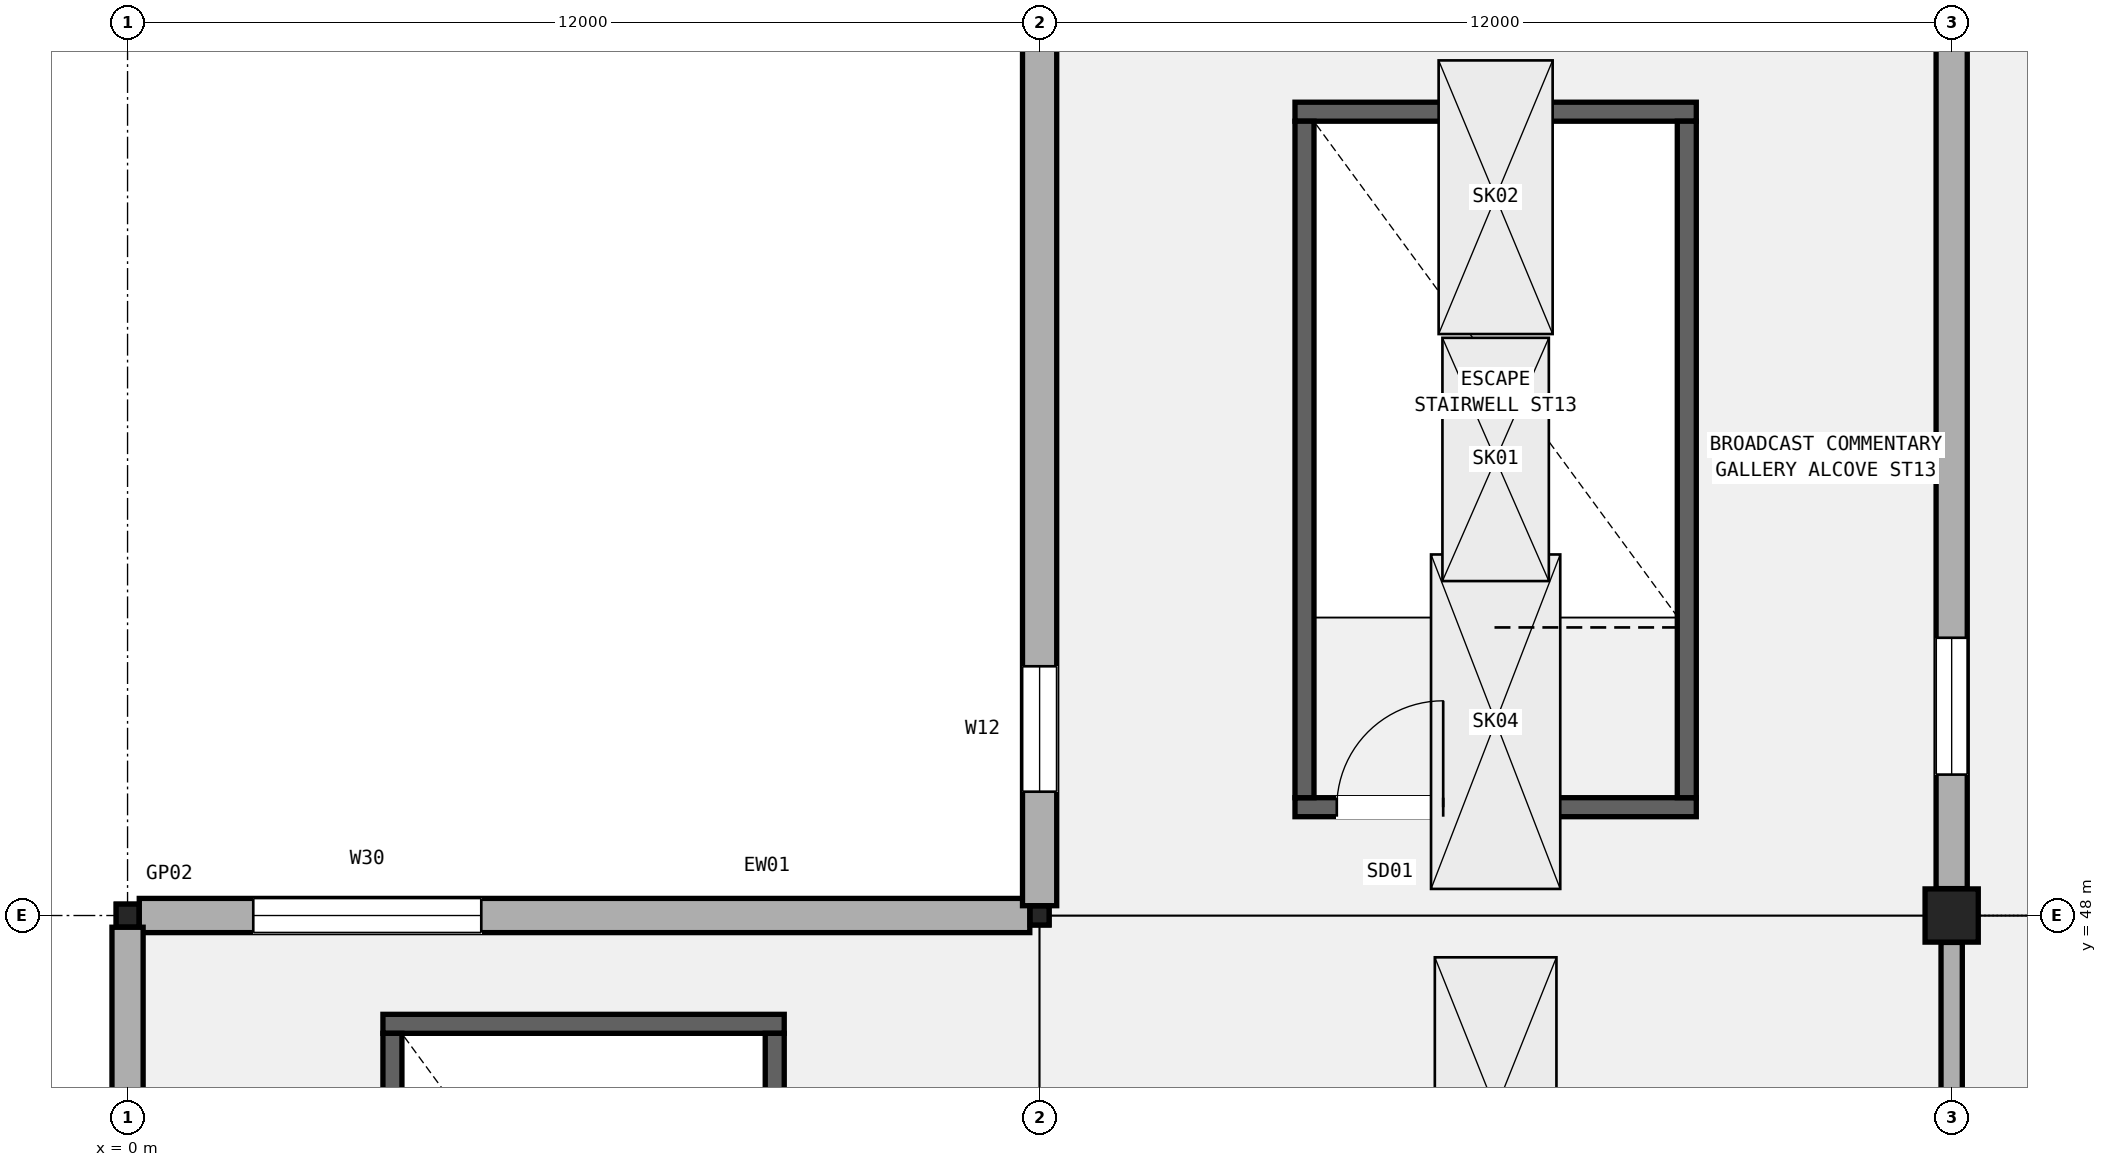
"""IFC4 building model, lengths in metres.
Left out: names, types, materials, properties, quantities, classifications, styles, units other than length and angle.
Written with IfcOpenShell. Run it as: python <this file> out.ifc"""

import sys

from ifc_helpers import new_model, si_unit, direction, frame, frame_2d, origin, origin_2d, place, context, subcontext, project, spatial, rectangle, hollow_rectangle, extrude, element, fill, save


model = new_model("IFC4")
c1 = context("Model", 3, precision=1e-05, world=origin(), true_north=direction((0.0, 1.0)))
c2 = subcontext(c1, "Body", "Model", "MODEL_VIEW")
j1 = project(units=[si_unit("LENGTHUNIT", "METRE"), si_unit("PLANEANGLEUNIT", "RADIAN")], contexts=[c1])
p1 = place(None, origin())
s1 = spatial("IfcSite", under=j1, at=p1, CompositionType="ELEMENT")
p2 = place(p1, origin())
s2 = spatial("IfcBuilding", under=s1, at=p2, CompositionType="ELEMENT")
p3 = place(p2, frame((0.0, 0.0, 25.8)))
s3 = spatial("IfcBuildingStorey", under=s2, at=p3, CompositionType="ELEMENT", Elevation=25.8)
p4 = place(p3, frame((0.0, 48.0, 0.0), z_axis=(0.0, 0.0, 1.0), x_axis=(1.0, 0.0, 0.0)))
e1 = element("IfcColumn", 1, at=p4, inside=s3, PredefinedType="COLUMN", context=c2, shape_type="SweptSolid", body=[
    extrude(hollow_rectangle(XDim=0.3, YDim=0.3, WallThickness=0.012, InnerFilletRadius=0.012, OuterFilletRadius=0.024, at=origin_2d()), origin(), (0.0, 0.0, 1.0), 5.4),
])
p5 = place(p3, frame((12.0, 48.0, 0.0), z_axis=(0.0, 0.0, 1.0), x_axis=(1.0, 0.0, 0.0)))
e2 = element("IfcColumn", 2, at=p5, inside=s3, PredefinedType="COLUMN", context=c2, shape_type="SweptSolid", body=[
    extrude(hollow_rectangle(XDim=0.25, YDim=0.25, WallThickness=0.012, InnerFilletRadius=0.012, OuterFilletRadius=0.024, at=origin_2d()), origin(), (0.0, 0.0, 1.0), 5.4),
])
p6 = place(p3, frame((24.0, 48.0, 0.0), z_axis=(0.0, 0.0, 1.0), x_axis=(1.0, 0.0, 0.0)))
e3 = element("IfcColumn", 3, at=p6, inside=s3, PredefinedType="COLUMN", context=c2, shape_type="SweptSolid", body=[
    extrude(rectangle(XDim=0.7, YDim=0.7, at=origin_2d()), origin(), (0.0, 0.0, 1.0), 5.4),
])
p7 = place(p3, frame((0.154, 48.0, 0.0), z_axis=(0.0, 0.0, 1.0), x_axis=(1.0, 0.0, 0.0)))
e4 = element("IfcWall", 4, at=p7, inside=s3, PredefinedType="SOLIDWALL", context=c2, shape_type="SweptSolid", body=[
    extrude(rectangle(XDim=11.717, YDim=0.45, at=frame_2d((5.858, 0.0))), origin(), (0.0, 0.0, 1.0), 4.44),
])
p8 = place(p7, frame((1.5, 0.0, 0.95)))
e5 = element("IfcOpeningElement", 5, at=p8, cuts=e4, PredefinedType="OPENING", context=c2, shape_type="SweptSolid", body=[
    extrude(rectangle(XDim=3.0, YDim=1.7, at=frame_2d((1.5, 0.85))), frame((0.0, 0.235, 0.0), z_axis=(0.0, -1.0, 0.0), x_axis=(1.0, 0.0, 0.0)), (0.0, 0.0, 1.0), 0.47),
])
p9 = place(p3, frame((0.0, 36.179, 0.0), z_axis=(0.0, 0.0, 1.0), x_axis=(0.0, 1.0, 0.0)))
e6 = element("IfcWall", 6, at=p9, inside=s3, PredefinedType="SOLIDWALL", context=c2, shape_type="SweptSolid", body=[
    extrude(rectangle(XDim=11.667, YDim=0.41, at=frame_2d((5.833, 0.0))), origin(), (0.0, 0.0, 1.0), 4.34),
])
p10 = place(p9, frame((1.5, 0.0, 0.95)))
e7 = element("IfcOpeningElement", 7, at=p10, cuts=e6, PredefinedType="OPENING", context=c2, shape_type="SweptSolid", body=[
    extrude(rectangle(XDim=3.0, YDim=2.15, at=frame_2d((1.5, 1.075))), frame((0.0, 0.215, 0.0), z_axis=(0.0, -1.0, 0.0), x_axis=(1.0, 0.0, 0.0)), (0.0, 0.0, 1.0), 0.43),
])
p11 = place(p3, frame((24.0, 36.129, 0.0), z_axis=(0.0, 0.0, 1.0), x_axis=(0.0, 1.0, 0.0)))
e8 = element("IfcWall", 8, at=p11, inside=s3, PredefinedType="SOLIDWALL", context=c2, shape_type="SweptSolid", body=[
    extrude(rectangle(XDim=11.517, YDim=0.28, at=frame_2d((5.759, 0.0))), origin(), (0.0, 0.0, 1.0), 4.13),
])
p12 = place(p11, frame((1.5, 0.0, 0.95)))
e9 = element("IfcOpeningElement", 9, at=p12, cuts=e8, PredefinedType="OPENING", context=c2, shape_type="SweptSolid", body=[
    extrude(rectangle(XDim=1.65, YDim=2.05, at=frame_2d((0.825, 1.025))), frame((0.0, 0.15, 0.0), z_axis=(0.0, -1.0, 0.0), x_axis=(1.0, 0.0, 0.0)), (0.0, 0.0, 1.0), 0.3),
])
p13 = place(p3, frame((12.0, 48.129, 0.0), z_axis=(0.0, 0.0, 1.0), x_axis=(0.0, 1.0, 0.0)))
e10 = element("IfcWall", 10, at=p13, inside=s3, PredefinedType="SOLIDWALL", context=c2, shape_type="SweptSolid", body=[
    extrude(rectangle(XDim=11.517, YDim=0.45, at=frame_2d((5.759, 0.0))), origin(), (0.0, 0.0, 1.0), 4.452),
])
p14 = place(p13, frame((1.5, 0.0, 0.95)))
e11 = element("IfcOpeningElement", 11, at=p14, cuts=e10, PredefinedType="OPENING", context=c2, shape_type="SweptSolid", body=[
    extrude(rectangle(XDim=1.65, YDim=2.45, at=frame_2d((0.825, 1.225))), frame((0.0, 0.235, 0.0), z_axis=(0.0, -1.0, 0.0), x_axis=(1.0, 0.0, 0.0)), (0.0, 0.0, 1.0), 0.47),
])
p15 = place(p3, frame((24.0, 48.354, 0.0), z_axis=(0.0, 0.0, 1.0), x_axis=(0.0, 1.0, 0.0)))
e12 = element("IfcWall", 12, at=p15, inside=s3, PredefinedType="SOLIDWALL", context=c2, shape_type="SweptSolid", body=[
    extrude(rectangle(XDim=11.342, YDim=0.41, at=frame_2d((5.671, 0.0))), origin(), (0.0, 0.0, 1.0), 4.13),
])
p16 = place(p15, frame((1.5, 0.0, 0.95)))
e13 = element("IfcOpeningElement", 13, at=p16, cuts=e12, PredefinedType="OPENING", context=c2, shape_type="SweptSolid", body=[
    extrude(rectangle(XDim=1.8, YDim=1.75, at=frame_2d((0.9, 0.875))), frame((0.0, 0.215, 0.0), z_axis=(0.0, -1.0, 0.0), x_axis=(1.0, 0.0, 0.0)), (0.0, 0.0, 1.0), 0.43),
])
p17 = place(p3, frame((3.36, 46.575, 0.0), z_axis=(0.0, 0.0, 1.0), x_axis=(1.0, 0.0, 0.0)))
e14 = element("IfcWall", 14, at=p17, inside=s3, PredefinedType="SHEAR", context=c2, shape_type="SweptSolid", body=[
    extrude(rectangle(XDim=5.28, YDim=0.25, at=frame_2d((2.64, 0.0))), origin(), (0.0, 0.0, 1.0), 5.04),
])
for number, where, z_axis, x_axis in (
    (15, (3.485, 37.55, 0.0), (0.0, 0.0, 1.0), (0.0, 1.0, 0.0)),
    (16, (8.515, 37.55, 0.0), (0.0, 0.0, 1.0), (0.0, 1.0, 0.0)),
):
    element("IfcWall", number, at=place(p3, frame(where, z_axis=z_axis, x_axis=x_axis)), inside=s3, PredefinedType="SHEAR", context=c2, shape_type="SweptSolid", body=[
        extrude(rectangle(XDim=8.9, YDim=0.25, at=frame_2d((4.45, 0.0))), origin(), (0.0, 0.0, 1.0), 5.04),
    ])
p18 = place(p3, frame((15.36, 49.425, 0.0), z_axis=(0.0, 0.0, 1.0), x_axis=(1.0, 0.0, 0.0)))
e17 = element("IfcWall", 17, at=p18, inside=s3, PredefinedType="SHEAR", context=c2, shape_type="SweptSolid", body=[
    extrude(rectangle(XDim=5.28, YDim=0.25, at=frame_2d((2.64, 0.0))), origin(), (0.0, 0.0, 1.0), 5.04),
])
p19 = place(p18, frame((0.55, 0.0, 0.0)))
e18 = element("IfcOpeningElement", 18, at=p19, cuts=e17, PredefinedType="OPENING", context=c2, shape_type="SweptSolid", body=[
    extrude(rectangle(XDim=1.4, YDim=2.15, at=frame_2d((0.7, 1.075))), frame((0.0, 0.135, 0.0), z_axis=(0.0, -1.0, 0.0), x_axis=(1.0, 0.0, 0.0)), (0.0, 0.0, 1.0), 0.27),
])
p20 = place(p3, frame((15.36, 58.575, 0.0), z_axis=(0.0, 0.0, 1.0), x_axis=(1.0, 0.0, 0.0)))
e19 = element("IfcWall", 19, at=p20, inside=s3, PredefinedType="SHEAR", context=c2, shape_type="SweptSolid", body=[
    extrude(rectangle(XDim=5.28, YDim=0.25, at=frame_2d((2.64, 0.0))), origin(), (0.0, 0.0, 1.0), 5.04),
])
for number, where, z_axis, x_axis in (
    (20, (15.485, 49.55, 0.0), (0.0, 0.0, 1.0), (0.0, 1.0, 0.0)),
    (21, (20.515, 49.55, 0.0), (0.0, 0.0, 1.0), (0.0, 1.0, 0.0)),
):
    element("IfcWall", number, at=place(p3, frame(where, z_axis=z_axis, x_axis=x_axis)), inside=s3, PredefinedType="SHEAR", context=c2, shape_type="SweptSolid", body=[
        extrude(rectangle(XDim=8.9, YDim=0.25, at=frame_2d((4.45, 0.0))), origin(), (0.0, 0.0, 1.0), 5.04),
    ])
p21 = place(p8, origin())
e22 = element("IfcWindow", 22, at=p21, inside=s3, PartitioningType="SINGLE_PANEL", PredefinedType="WINDOW", context=c2, shape_type="SweptSolid", body=[
    extrude(rectangle(XDim=3.0, YDim=1.7, at=frame_2d((1.5, 0.85))), frame((0.0, 0.03, 0.0), z_axis=(0.0, -1.0, 0.0), x_axis=(1.0, 0.0, 0.0)), (0.0, 0.0, 1.0), 0.06),
])
fill(e5, e22)
p22 = place(p14, origin())
e23 = element("IfcWindow", 23, at=p22, inside=s3, PartitioningType="SINGLE_PANEL", PredefinedType="WINDOW", context=c2, shape_type="SweptSolid", body=[
    extrude(rectangle(XDim=1.65, YDim=2.45, at=frame_2d((0.825, 1.225))), frame((0.0, 0.03, 0.0), z_axis=(0.0, -1.0, 0.0), x_axis=(1.0, 0.0, 0.0)), (0.0, 0.0, 1.0), 0.06),
])
fill(e11, e23)
p23 = place(p16, origin())
e24 = element("IfcWindow", 24, at=p23, inside=s3, PartitioningType="SINGLE_PANEL", PredefinedType="WINDOW", context=c2, shape_type="SweptSolid", body=[
    extrude(rectangle(XDim=1.8, YDim=1.75, at=frame_2d((0.9, 0.875))), frame((0.0, 0.03, 0.0), z_axis=(0.0, -1.0, 0.0), x_axis=(1.0, 0.0, 0.0)), (0.0, 0.0, 1.0), 0.06),
])
fill(e13, e24)
p24 = place(p2, frame((0.0, 0.0, 31.2)))
p25 = place(p24, frame((0.0, 0.0, -0.36)))
p26 = place(p25, frame((18.0, 45.45, 0.0)))
p27 = place(p26, frame((0.0, 0.0, 0.31)))
e25 = element("IfcWindow", 25, at=p27, inside=s3, PartitioningType="SINGLE_PANEL", PredefinedType="SKYLIGHT", context=c2, shape_type="SweptSolid", body=[
    extrude(rectangle(XDim=4.0, YDim=1.6, at=origin_2d()), origin(), (0.0, 0.0, 1.0), 0.05),
])
p28 = place(p24, frame((0.0, 0.0, -0.36)))
p29 = place(p28, frame((18.0, 50.55, 0.0)))
p30 = place(p29, frame((0.0, 0.0, 0.31)))
e26 = element("IfcWindow", 26, at=p30, inside=s3, PartitioningType="SINGLE_PANEL", PredefinedType="SKYLIGHT", context=c2, shape_type="SweptSolid", body=[
    extrude(rectangle(XDim=4.4, YDim=1.7, at=origin_2d()), origin(), (0.0, 0.0, 1.0), 0.05),
])
p31 = place(p28, frame((18.0, 54.0, 0.0)))
p32 = place(p31, frame((0.0, 0.0, 0.31)))
e27 = element("IfcWindow", 27, at=p32, inside=s3, PartitioningType="SINGLE_PANEL", PredefinedType="SKYLIGHT", context=c2, shape_type="SweptSolid", body=[
    extrude(rectangle(XDim=3.2, YDim=1.4, at=origin_2d()), origin(), (0.0, 0.0, 1.0), 0.05),
])
p33 = place(p28, frame((18.0, 57.45, 0.0)))
p34 = place(p33, frame((0.0, 0.0, 0.31)))
e28 = element("IfcWindow", 28, at=p34, inside=s3, PartitioningType="SINGLE_PANEL", PredefinedType="SKYLIGHT", context=c2, shape_type="SweptSolid", body=[
    extrude(rectangle(XDim=3.6, YDim=1.5, at=origin_2d()), origin(), (0.0, 0.0, 1.0), 0.05),
])
p35 = place(p19, origin())
e29 = element("IfcDoor", 29, at=p35, inside=s3, OperationType="SINGLE_SWING_RIGHT", PredefinedType="DOOR", context=c2, shape_type="SweptSolid", body=[
    extrude(rectangle(XDim=1.4, YDim=2.15, at=frame_2d((0.7, 1.075))), frame((0.0, 0.025, 0.0), z_axis=(0.0, -1.0, 0.0), x_axis=(1.0, 0.0, 0.0)), (0.0, 0.0, 1.0), 0.05),
])
fill(e18, e29)
save(model, sys.argv[1])
